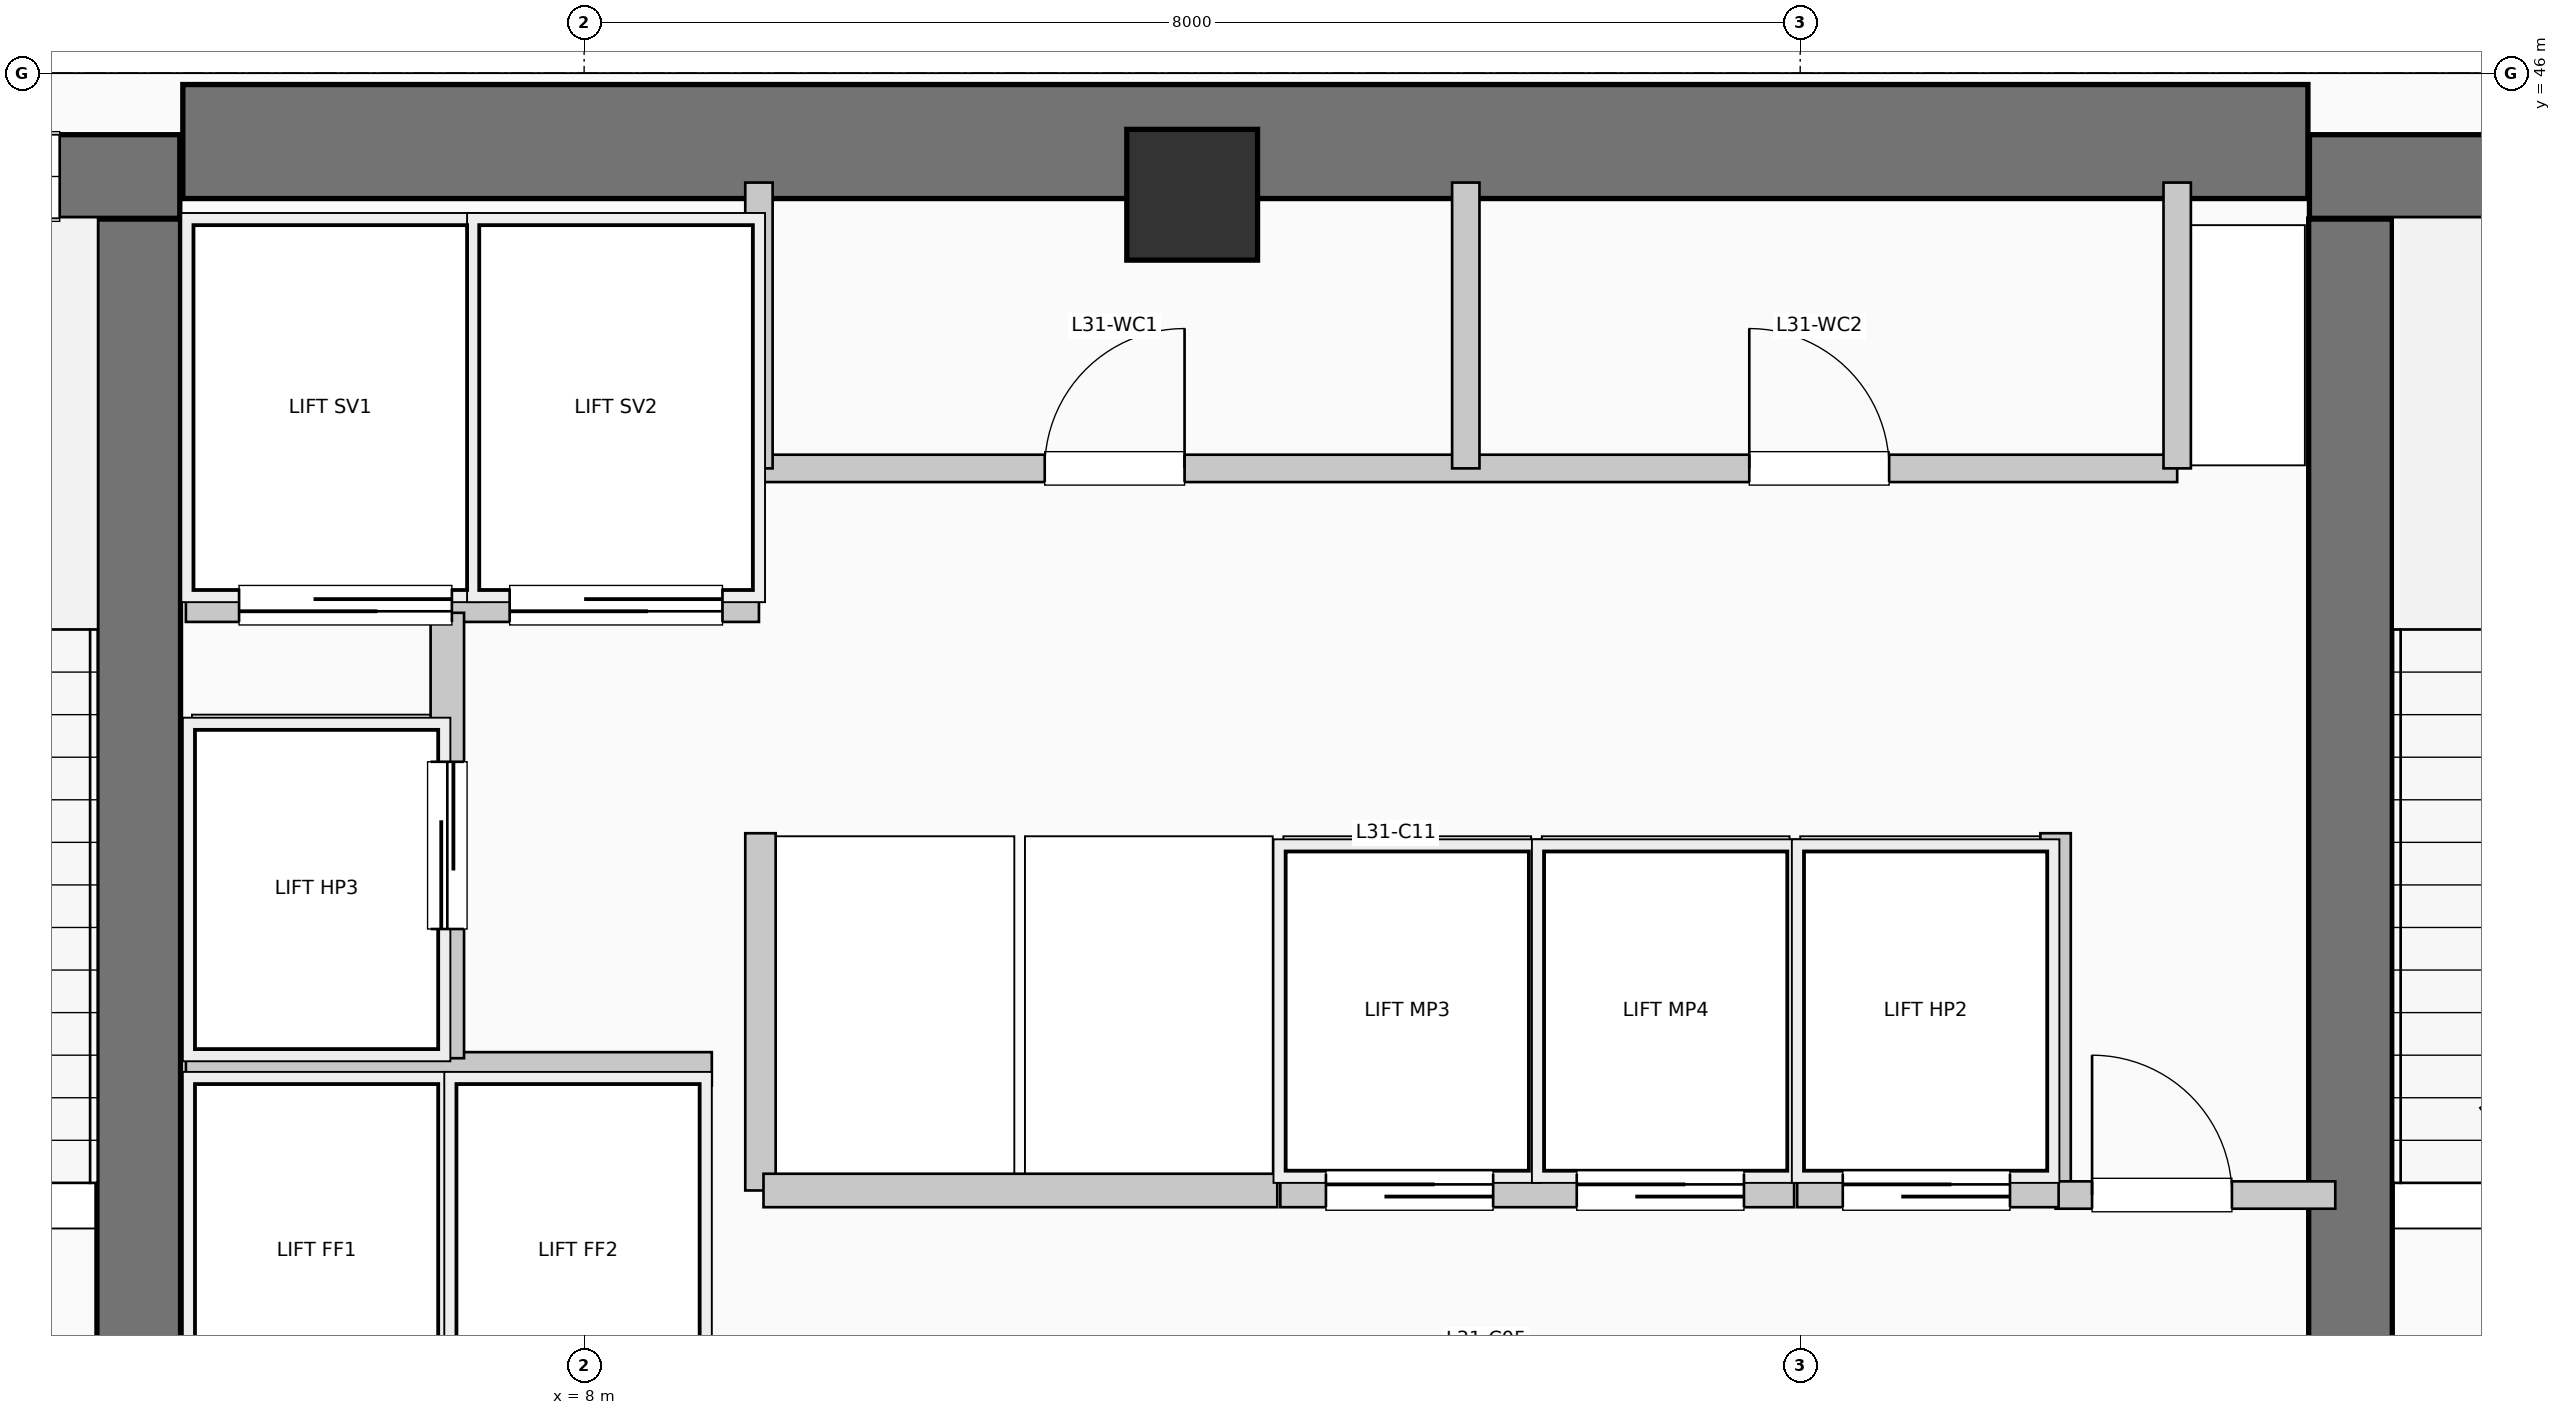
"""IFC4 building model, lengths in metres.
Left out: names, types, materials, properties, quantities, classifications, styles, units other than length and angle.
Written with IfcOpenShell. Run it as: python <this file> out.ifc"""

import sys

from ifc_helpers import new_model, si_unit, direction, frame, frame_2d, origin, origin_2d, place, context, subcontext, project, spatial, rectangle, extrude, element, fill, save


model = new_model("IFC4")
c1 = context("Model", 3, precision=1e-05, world=origin(), true_north=direction((0.0, 1.0)))
c2 = subcontext(c1, "Body", "Model", "MODEL_VIEW")
j1 = project(units=[si_unit("LENGTHUNIT", "METRE"), si_unit("PLANEANGLEUNIT", "RADIAN")], contexts=[c1])
p1 = place(None, origin())
s1 = spatial("IfcSite", under=j1, at=p1, CompositionType="ELEMENT")
p2 = place(p1, origin())
s2 = spatial("IfcBuilding", under=s1, at=p2, CompositionType="ELEMENT")
p3 = place(p2, frame((0.0, 0.0, 130.35)))
s3 = spatial("IfcBuildingStorey", under=s2, at=p3, CompositionType="ELEMENT", Elevation=130.35)
p4 = place(p3, frame((5.36, 45.55, 0.0), z_axis=(0.0, 0.0, 1.0), x_axis=(1.0, 0.0, 0.0)))
e1 = element("IfcWall", 1, at=p4, inside=s3, PredefinedType="SHEAR", context=c2, shape_type="SweptSolid", body=[
    extrude(rectangle(XDim=13.98, YDim=0.75, at=frame_2d((6.99, 0.0))), origin(), (0.0, 0.0, 1.0), 4.62),
])
p5 = place(p3, frame((5.07, 37.15, 0.0), z_axis=(0.0, 0.0, 1.0), x_axis=(0.0, 1.0, 0.0)))
e2 = element("IfcWall", 2, at=p5, inside=s3, PredefinedType="SHEAR", context=c2, shape_type="SweptSolid", body=[
    extrude(rectangle(XDim=7.89, YDim=0.55, at=frame_2d((3.945, 0.0))), origin(), (0.0, 0.0, 1.0), 4.62),
])
p6 = place(p3, frame((1.1, 45.32, 0.0), z_axis=(0.0, 0.0, 1.0), x_axis=(1.0, 0.0, 0.0)))
e3 = element("IfcWall", 3, at=p6, inside=s3, PredefinedType="SHEAR", context=c2, shape_type="SweptSolid", body=[
    extrude(rectangle(XDim=4.24, YDim=0.55, at=frame_2d((2.12, 0.0))), origin(), (0.0, 0.0, 1.0), 4.62),
])
p7 = place(p6, frame((2.05, 0.0, 1.05)))
e4 = element("IfcOpeningElement", 4, at=p7, cuts=e3, PredefinedType="OPENING", context=c2, shape_type="SweptSolid", body=[
    extrude(rectangle(XDim=1.4, YDim=1.8, at=frame_2d((0.7, 0.9))), frame((0.0, 0.285, 0.0), z_axis=(0.0, -1.0, 0.0), x_axis=(1.0, 0.0, 0.0)), (0.0, 0.0, 1.0), 0.57),
])
p8 = place(p3, frame((19.62, 37.15, 0.0), z_axis=(0.0, 0.0, 1.0), x_axis=(0.0, 1.0, 0.0)))
e5 = element("IfcWall", 5, at=p8, inside=s3, PredefinedType="SHEAR", context=c2, shape_type="SweptSolid", body=[
    extrude(rectangle(XDim=7.89, YDim=0.55, at=frame_2d((3.945, 0.0))), origin(), (0.0, 0.0, 1.0), 4.62),
])
p9 = place(p3, frame((19.35, 45.32, 0.0), z_axis=(0.0, 0.0, 1.0), x_axis=(1.0, 0.0, 0.0)))
e6 = element("IfcWall", 6, at=p9, inside=s3, PredefinedType="SHEAR", context=c2, shape_type="SweptSolid", body=[
    extrude(rectangle(XDim=3.69, YDim=0.55, at=frame_2d((1.845, 0.0))), origin(), (0.0, 0.0, 1.0), 4.62),
])
p10 = place(p9, frame((1.15, 0.0, 1.05)))
e7 = element("IfcOpeningElement", 7, at=p10, cuts=e6, PredefinedType="OPENING", context=c2, shape_type="SweptSolid", body=[
    extrude(rectangle(XDim=1.4, YDim=1.8, at=frame_2d((0.7, 0.9))), frame((0.0, 0.285, 0.0), z_axis=(0.0, -1.0, 0.0), x_axis=(1.0, 0.0, 0.0)), (0.0, 0.0, 1.0), 0.57),
])
p11 = place(p3, frame((12.0, 45.2, 0.0), z_axis=(0.0, 0.0, 1.0), x_axis=(1.0, 0.0, 0.0)))
e8 = element("IfcColumn", 8, at=p11, inside=s3, PredefinedType="COLUMN", context=c2, shape_type="SweptSolid", body=[
    extrude(rectangle(XDim=0.86, YDim=0.86, at=origin_2d()), origin(), (0.0, 0.0, 1.0), 4.62),
])
p12 = place(p3, frame((5.38, 39.45, 0.0), z_axis=(0.0, 0.0, 1.0), x_axis=(1.0, 0.0, 0.0)))
e9 = element("IfcWall", 9, at=p12, inside=s3, PredefinedType="PARTITIONING", context=c2, shape_type="SweptSolid", body=[
    extrude(rectangle(XDim=3.46, YDim=0.22, at=frame_2d((1.73, 0.0))), origin(), (0.0, 0.0, 1.0), 4.37),
])
p13 = place(p3, frame((5.38, 42.5, 0.0), z_axis=(0.0, 0.0, 1.0), x_axis=(1.0, 0.0, 0.0)))
e10 = element("IfcWall", 10, at=p13, inside=s3, PredefinedType="PARTITIONING", context=c2, shape_type="SweptSolid", body=[
    extrude(rectangle(XDim=3.77, YDim=0.22, at=frame_2d((1.885, 0.0))), origin(), (0.0, 0.0, 1.0), 4.37),
])
p14 = place(p13, frame((1.75, 0.0, 0.0), z_axis=(0.0, 0.0, 1.0), x_axis=(-1.0, 0.0, 0.0)))
e11 = element("IfcOpeningElement", 11, at=p14, cuts=e10, PredefinedType="OPENING", context=c2, shape_type="SweptSolid", body=[
    extrude(rectangle(XDim=1.4, YDim=2.2, at=frame_2d((0.7, 1.1))), frame((0.0, 0.12, 0.0), z_axis=(0.0, -1.0, 0.0), x_axis=(1.0, 0.0, 0.0)), (0.0, 0.0, 1.0), 0.24),
])
p15 = place(p13, frame((3.53, 0.0, 0.0), z_axis=(0.0, 0.0, 1.0), x_axis=(-1.0, 0.0, 0.0)))
e12 = element("IfcOpeningElement", 12, at=p15, cuts=e10, PredefinedType="OPENING", context=c2, shape_type="SweptSolid", body=[
    extrude(rectangle(XDim=1.4, YDim=2.2, at=frame_2d((0.7, 1.1))), frame((0.0, 0.12, 0.0), z_axis=(0.0, -1.0, 0.0), x_axis=(1.0, 0.0, 0.0)), (0.0, 0.0, 1.0), 0.24),
])
p16 = place(p3, frame((7.1, 39.52, 0.0), z_axis=(0.0, 0.0, 1.0), x_axis=(0.0, 1.0, 0.0)))
e13 = element("IfcWall", 13, at=p16, inside=s3, PredefinedType="PARTITIONING", context=c2, shape_type="SweptSolid", body=[
    extrude(rectangle(XDim=2.93, YDim=0.22, at=frame_2d((1.465, 0.0))), origin(), (0.0, 0.0, 1.0), 4.37),
])
p17 = place(p16, frame((0.85, 0.0, 0.0)))
e14 = element("IfcOpeningElement", 14, at=p17, cuts=e13, PredefinedType="OPENING", context=c2, shape_type="SweptSolid", body=[
    extrude(rectangle(XDim=1.1, YDim=2.2, at=frame_2d((0.55, 1.1))), frame((0.0, 0.12, 0.0), z_axis=(0.0, -1.0, 0.0), x_axis=(1.0, 0.0, 0.0)), (0.0, 0.0, 1.0), 0.24),
])
for number, where, z_axis, x_axis in (
    (15, (9.16, 38.65, 0.0), (0.0, 0.0, 1.0), (0.0, 1.0, 0.0)),
    (16, (17.68, 38.65, 0.0), (0.0, 0.0, 1.0), (0.0, 1.0, 0.0)),
):
    element("IfcWall", number, at=place(p3, frame(where, z_axis=z_axis, x_axis=x_axis)), inside=s3, PredefinedType="PARTITIONING", context=c2, shape_type="SweptSolid", body=[
        extrude(rectangle(XDim=2.35, YDim=0.2, at=frame_2d((1.175, 0.0))), origin(), (0.0, 0.0, 1.0), 4.37),
    ])
p18 = place(p3, frame((17.68, 38.62, 0.0), z_axis=(0.0, 0.0, 1.0), x_axis=(1.0, 0.0, 0.0)))
e17 = element("IfcWall", 17, at=p18, inside=s3, PredefinedType="PARTITIONING", context=c2, shape_type="SweptSolid", body=[
    extrude(rectangle(XDim=1.84, YDim=0.18, at=frame_2d((0.92, 0.0))), origin(), (0.0, 0.0, 1.0), 4.37),
])
p19 = place(p18, frame((0.24, 0.0, 0.0)))
e18 = element("IfcOpeningElement", 18, at=p19, cuts=e17, PredefinedType="OPENING", context=c2, shape_type="SweptSolid", body=[
    extrude(rectangle(XDim=0.92, YDim=2.1, at=frame_2d((0.46, 1.05))), frame((0.0, 0.1, 0.0), z_axis=(0.0, -1.0, 0.0), x_axis=(1.0, 0.0, 0.0)), (0.0, 0.0, 1.0), 0.2),
])
p20 = place(p3, frame((9.18, 38.65, 0.0), z_axis=(0.0, 0.0, 1.0), x_axis=(1.0, 0.0, 0.0)))
e19 = element("IfcWall", 19, at=p20, inside=s3, PredefinedType="PARTITIONING", context=c2, shape_type="SweptSolid", body=[
    extrude(rectangle(XDim=3.38, YDim=0.22, at=frame_2d((1.69, 0.0))), origin(), (0.0, 0.0, 1.0), 4.37),
])
p21 = place(p3, frame((12.58, 38.65, 0.0), z_axis=(0.0, 0.0, 1.0), x_axis=(1.0, 0.0, 0.0)))
e20 = element("IfcWall", 20, at=p21, inside=s3, PredefinedType="PARTITIONING", context=c2, shape_type="SweptSolid", body=[
    extrude(rectangle(XDim=3.38, YDim=0.22, at=frame_2d((1.69, 0.0))), origin(), (0.0, 0.0, 1.0), 4.37),
])
p22 = place(p21, frame((0.3, 0.0, 0.0)))
e21 = element("IfcOpeningElement", 21, at=p22, cuts=e20, PredefinedType="OPENING", context=c2, shape_type="SweptSolid", body=[
    extrude(rectangle(XDim=1.1, YDim=2.2, at=frame_2d((0.55, 1.1))), frame((0.0, 0.12, 0.0), z_axis=(0.0, -1.0, 0.0), x_axis=(1.0, 0.0, 0.0)), (0.0, 0.0, 1.0), 0.24),
])
p23 = place(p21, frame((1.95, 0.0, 0.0)))
e22 = element("IfcOpeningElement", 22, at=p23, cuts=e20, PredefinedType="OPENING", context=c2, shape_type="SweptSolid", body=[
    extrude(rectangle(XDim=1.1, YDim=2.2, at=frame_2d((0.55, 1.1))), frame((0.0, 0.12, 0.0), z_axis=(0.0, -1.0, 0.0), x_axis=(1.0, 0.0, 0.0)), (0.0, 0.0, 1.0), 0.24),
])
p24 = place(p3, frame((15.98, 38.65, 0.0), z_axis=(0.0, 0.0, 1.0), x_axis=(1.0, 0.0, 0.0)))
e23 = element("IfcWall", 23, at=p24, inside=s3, PredefinedType="PARTITIONING", context=c2, shape_type="SweptSolid", body=[
    extrude(rectangle(XDim=1.72, YDim=0.22, at=frame_2d((0.86, 0.0))), origin(), (0.0, 0.0, 1.0), 4.37),
])
p25 = place(p24, frame((0.3, 0.0, 0.0)))
e24 = element("IfcOpeningElement", 24, at=p25, cuts=e23, PredefinedType="OPENING", context=c2, shape_type="SweptSolid", body=[
    extrude(rectangle(XDim=1.1, YDim=2.2, at=frame_2d((0.55, 1.1))), frame((0.0, 0.12, 0.0), z_axis=(0.0, -1.0, 0.0), x_axis=(1.0, 0.0, 0.0)), (0.0, 0.0, 1.0), 0.24),
])
p26 = place(p3, frame((9.15, 43.4, 0.0), z_axis=(0.0, 0.0, 1.0), x_axis=(1.0, 0.0, 0.0)))
e25 = element("IfcWall", 25, at=p26, inside=s3, PredefinedType="PLUMBINGWALL", context=c2, shape_type="SweptSolid", body=[
    extrude(rectangle(XDim=9.33, YDim=0.18, at=frame_2d((4.665, 0.0))), origin(), (0.0, 0.0, 1.0), 4.37),
])
p27 = place(p26, frame((1.88, 0.0, 0.0)))
e26 = element("IfcOpeningElement", 26, at=p27, cuts=e25, PredefinedType="OPENING", context=c2, shape_type="SweptSolid", body=[
    extrude(rectangle(XDim=0.92, YDim=2.1, at=frame_2d((0.46, 1.05))), frame((0.0, 0.1, 0.0), z_axis=(0.0, -1.0, 0.0), x_axis=(1.0, 0.0, 0.0)), (0.0, 0.0, 1.0), 0.2),
])
p28 = place(p26, frame((6.515, 0.0, 0.0)))
e27 = element("IfcOpeningElement", 27, at=p28, cuts=e25, PredefinedType="OPENING", context=c2, shape_type="SweptSolid", body=[
    extrude(rectangle(XDim=0.92, YDim=2.1, at=frame_2d((0.46, 1.05))), frame((0.0, 0.1, 0.0), z_axis=(0.0, -1.0, 0.0), x_axis=(1.0, 0.0, 0.0)), (0.0, 0.0, 1.0), 0.2),
])
for number, where, z_axis, x_axis in (
    (28, (9.15, 43.4, 0.0), (0.0, 0.0, 1.0), (0.0, 1.0, 0.0)),
    (29, (18.48, 43.4, 0.0), (0.0, 0.0, 1.0), (0.0, 1.0, 0.0)),
    (30, (13.8, 43.4, 0.0), (0.0, 0.0, 1.0), (0.0, 1.0, 0.0)),
):
    element("IfcWall", number, at=place(p3, frame(where, z_axis=z_axis, x_axis=x_axis)), inside=s3, PredefinedType="PLUMBINGWALL", context=c2, shape_type="SweptSolid", body=[
        extrude(rectangle(XDim=1.88, YDim=0.18, at=frame_2d((0.94, 0.0))), origin(), (0.0, 0.0, 1.0), 4.37),
    ])
p29 = place(p7, origin())
e31 = element("IfcWindow", 31, at=p29, inside=s3, PartitioningType="SINGLE_PANEL", PredefinedType="WINDOW", context=c2, shape_type="SweptSolid", body=[
    extrude(rectangle(XDim=1.4, YDim=1.8, at=frame_2d((0.7, 0.9))), frame((0.0, 0.03, 0.0), z_axis=(0.0, -1.0, 0.0), x_axis=(1.0, 0.0, 0.0)), (0.0, 0.0, 1.0), 0.06),
])
fill(e4, e31)
p30 = place(p14, origin())
e32 = element("IfcDoor", 32, at=p30, inside=s3, OperationType="SLIDING_TO_LEFT", PredefinedType="DOOR", context=c2, shape_type="SweptSolid", body=[
    extrude(rectangle(XDim=1.4, YDim=2.2, at=frame_2d((0.7, 1.1))), frame((0.0, 0.025, 0.0), z_axis=(0.0, -1.0, 0.0), x_axis=(1.0, 0.0, 0.0)), (0.0, 0.0, 1.0), 0.05),
])
fill(e11, e32)
p31 = place(p15, origin())
e33 = element("IfcDoor", 33, at=p31, inside=s3, OperationType="SLIDING_TO_LEFT", PredefinedType="DOOR", context=c2, shape_type="SweptSolid", body=[
    extrude(rectangle(XDim=1.4, YDim=2.2, at=frame_2d((0.7, 1.1))), frame((0.0, 0.025, 0.0), z_axis=(0.0, -1.0, 0.0), x_axis=(1.0, 0.0, 0.0)), (0.0, 0.0, 1.0), 0.05),
])
fill(e12, e33)
p32 = place(p17, origin())
e34 = element("IfcDoor", 34, at=p32, inside=s3, OperationType="SLIDING_TO_LEFT", PredefinedType="DOOR", context=c2, shape_type="SweptSolid", body=[
    extrude(rectangle(XDim=1.1, YDim=2.2, at=frame_2d((0.55, 1.1))), frame((0.0, 0.025, 0.0), z_axis=(0.0, -1.0, 0.0), x_axis=(1.0, 0.0, 0.0)), (0.0, 0.0, 1.0), 0.05),
])
fill(e14, e34)
p33 = place(p19, origin())
e35 = element("IfcDoor", 35, at=p33, inside=s3, OperationType="SINGLE_SWING_LEFT", PredefinedType="DOOR", context=c2, shape_type="SweptSolid", body=[
    extrude(rectangle(XDim=0.92, YDim=2.1, at=frame_2d((0.46, 1.05))), frame((0.0, 0.025, 0.0), z_axis=(0.0, -1.0, 0.0), x_axis=(1.0, 0.0, 0.0)), (0.0, 0.0, 1.0), 0.05),
])
fill(e18, e35)
p34 = place(p22, origin())
e36 = element("IfcDoor", 36, at=p34, inside=s3, OperationType="SLIDING_TO_RIGHT", PredefinedType="DOOR", context=c2, shape_type="SweptSolid", body=[
    extrude(rectangle(XDim=1.1, YDim=2.2, at=frame_2d((0.55, 1.1))), frame((0.0, 0.025, 0.0), z_axis=(0.0, -1.0, 0.0), x_axis=(1.0, 0.0, 0.0)), (0.0, 0.0, 1.0), 0.05),
])
fill(e21, e36)
p35 = place(p23, origin())
e37 = element("IfcDoor", 37, at=p35, inside=s3, OperationType="SLIDING_TO_RIGHT", PredefinedType="DOOR", context=c2, shape_type="SweptSolid", body=[
    extrude(rectangle(XDim=1.1, YDim=2.2, at=frame_2d((0.55, 1.1))), frame((0.0, 0.025, 0.0), z_axis=(0.0, -1.0, 0.0), x_axis=(1.0, 0.0, 0.0)), (0.0, 0.0, 1.0), 0.05),
])
fill(e22, e37)
p36 = place(p25, origin())
e38 = element("IfcDoor", 38, at=p36, inside=s3, OperationType="SLIDING_TO_LEFT", PredefinedType="DOOR", context=c2, shape_type="SweptSolid", body=[
    extrude(rectangle(XDim=1.1, YDim=2.2, at=frame_2d((0.55, 1.1))), frame((0.0, 0.025, 0.0), z_axis=(0.0, -1.0, 0.0), x_axis=(1.0, 0.0, 0.0)), (0.0, 0.0, 1.0), 0.05),
])
fill(e24, e38)
p37 = place(p27, origin())
e39 = element("IfcDoor", 39, at=p37, inside=s3, OperationType="SINGLE_SWING_RIGHT", PredefinedType="DOOR", context=c2, shape_type="SweptSolid", body=[
    extrude(rectangle(XDim=0.92, YDim=2.1, at=frame_2d((0.46, 1.05))), frame((0.0, 0.025, 0.0), z_axis=(0.0, -1.0, 0.0), x_axis=(1.0, 0.0, 0.0)), (0.0, 0.0, 1.0), 0.05),
])
fill(e26, e39)
p38 = place(p28, origin())
e40 = element("IfcDoor", 40, at=p38, inside=s3, OperationType="SINGLE_SWING_LEFT", PredefinedType="DOOR", context=c2, shape_type="SweptSolid", body=[
    extrude(rectangle(XDim=0.92, YDim=2.1, at=frame_2d((0.46, 1.05))), frame((0.0, 0.025, 0.0), z_axis=(0.0, -1.0, 0.0), x_axis=(1.0, 0.0, 0.0)), (0.0, 0.0, 1.0), 0.05),
])
fill(e27, e40)
save(model, sys.argv[1])
